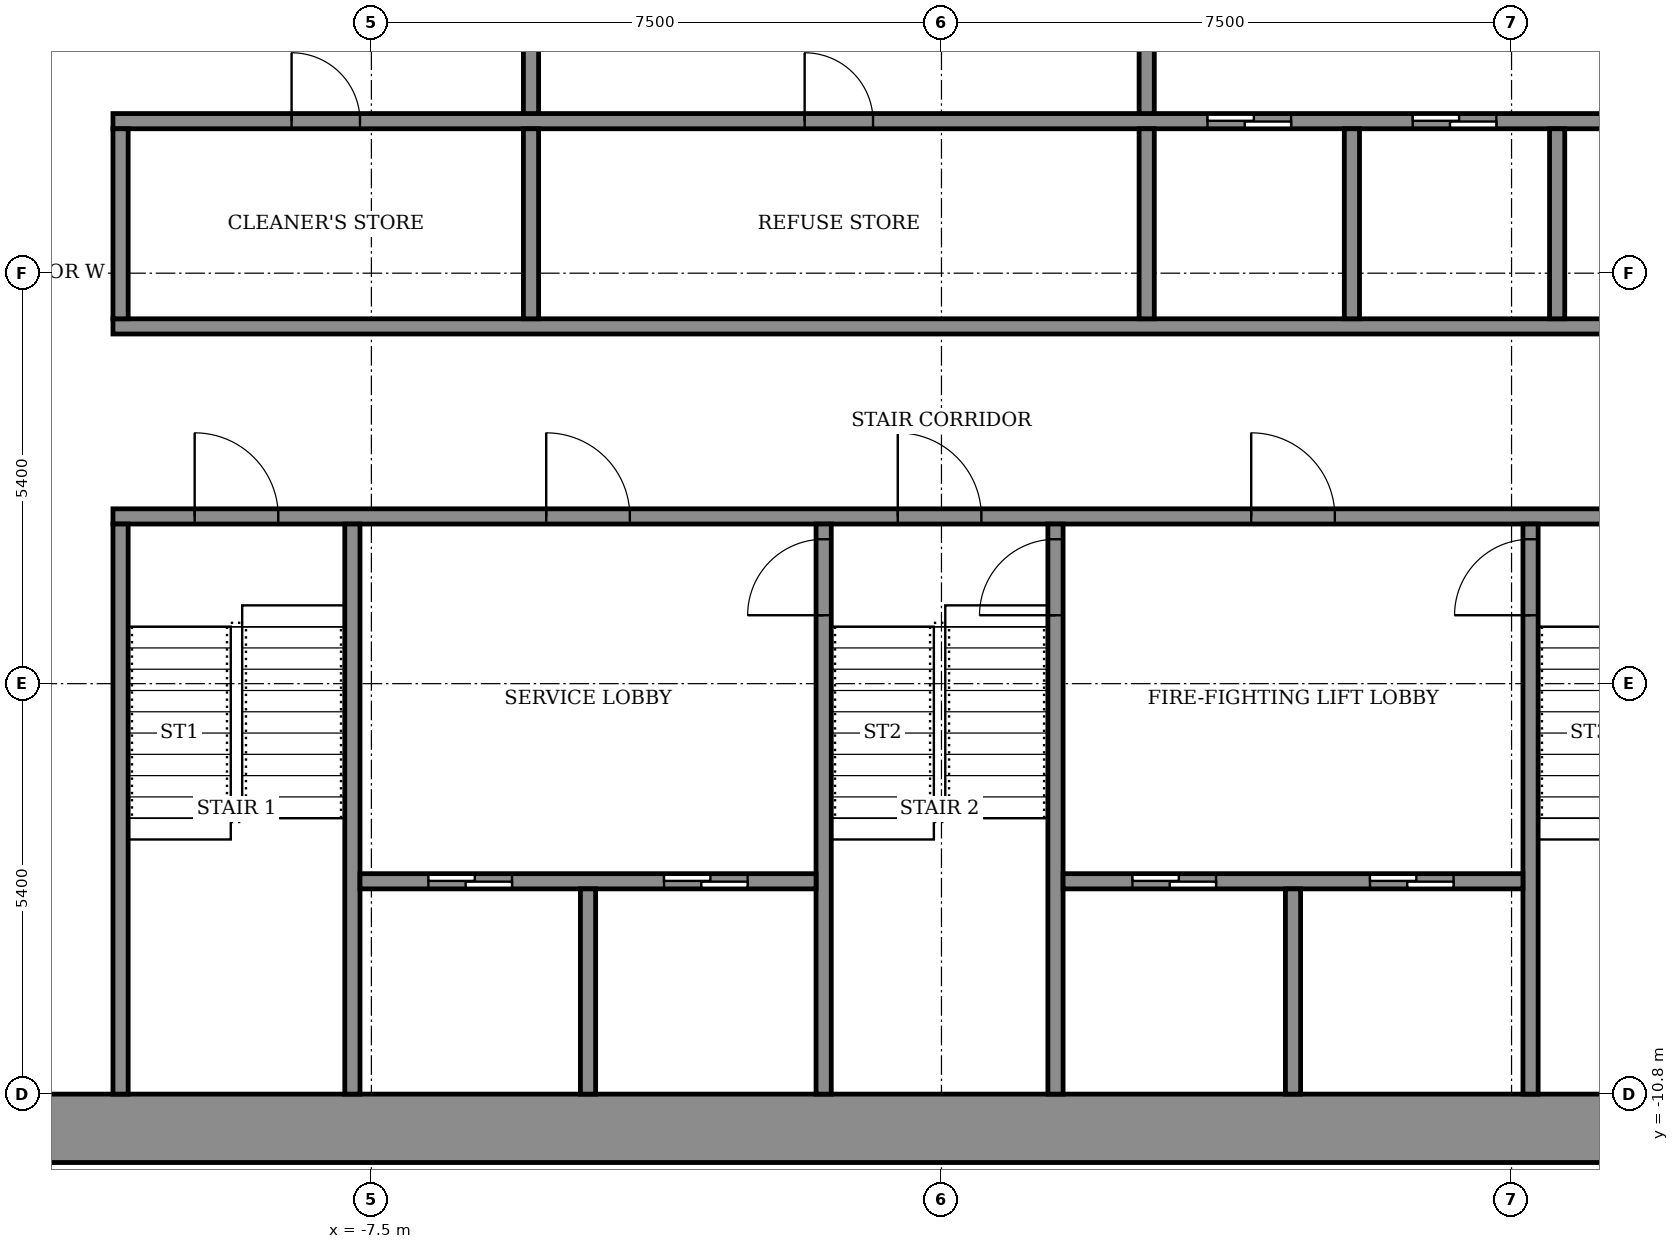
"""IFC4 building model, lengths in metres.
Left out: names, types, materials, properties, quantities, classifications, styles, units other than length and angle.
Written with IfcOpenShell. Run it as: python <this file> out.ifc"""

import sys

from ifc_helpers import new_model, si_unit, direction, frame, frame_2d, origin, place, context, subcontext, project, spatial, rectangle, extrude, element, fill, save


model = new_model("IFC4")
c1 = context("Model", 3, precision=1e-05, world=origin(), true_north=direction((0.0, 1.0)))
c2 = subcontext(c1, "Body", "Model", "MODEL_VIEW")
j1 = project(units=[si_unit("LENGTHUNIT", "METRE"), si_unit("PLANEANGLEUNIT", "RADIAN")], contexts=[c1])
p1 = place(None, origin())
s1 = spatial("IfcSite", under=j1, at=p1, CompositionType="ELEMENT")
p2 = place(p1, origin())
s2 = spatial("IfcBuilding", under=s1, at=p2, CompositionType="ELEMENT")
p3 = place(p2, frame((0.0, 0.0, 182.5)))
s3 = spatial("IfcBuildingStorey", under=s2, at=p3, CompositionType="ELEMENT", Elevation=182.5)
p4 = place(p3, frame((-14.7, -11.25, 0.0), z_axis=(0.0, 0.0, 1.0), x_axis=(1.0, 0.0, 0.0)))
e1 = element("IfcWall", 1, at=p4, inside=s3, PredefinedType="SHEAR", context=c2, shape_type="SweptSolid", body=[
    extrude(rectangle(XDim=29.4, YDim=0.9, at=frame_2d((14.7, 0.0))), origin(), (0.0, 0.0, 1.0), 3.6),
])
p5 = place(p3, frame((-10.9, -3.2, 0.0), z_axis=(0.0, 0.0, 1.0), x_axis=(1.0, 0.0, 0.0)))
e2 = element("IfcWall", 2, at=p5, inside=s3, PredefinedType="SHEAR", context=c2, shape_type="SweptSolid", body=[
    extrude(rectangle(XDim=21.8, YDim=0.2, at=frame_2d((10.9, 0.0))), origin(), (0.0, 0.0, 1.0), 3.05),
])
p6 = place(p5, frame((1.075, 0.0, 0.0)))
e3 = element("IfcOpeningElement", 3, at=p6, cuts=e2, PredefinedType="OPENING", context=c2, shape_type="SweptSolid", body=[
    extrude(rectangle(XDim=1.1, YDim=2.1, at=frame_2d((0.55, 1.05))), frame((0.0, 0.11, 0.0), z_axis=(0.0, -1.0, 0.0), x_axis=(1.0, 0.0, 0.0)), (0.0, 0.0, 1.0), 0.22),
])
p7 = place(p5, frame((10.325, 0.0, 0.0)))
e4 = element("IfcOpeningElement", 4, at=p7, cuts=e2, PredefinedType="OPENING", context=c2, shape_type="SweptSolid", body=[
    extrude(rectangle(XDim=1.1, YDim=2.1, at=frame_2d((0.55, 1.05))), frame((0.0, 0.11, 0.0), z_axis=(0.0, -1.0, 0.0), x_axis=(1.0, 0.0, 0.0)), (0.0, 0.0, 1.0), 0.22),
])
p8 = place(p5, frame((19.625, 0.0, 0.0)))
e5 = element("IfcOpeningElement", 5, at=p8, cuts=e2, PredefinedType="OPENING", context=c2, shape_type="SweptSolid", body=[
    extrude(rectangle(XDim=1.1, YDim=2.1, at=frame_2d((0.55, 1.05))), frame((0.0, 0.11, 0.0), z_axis=(0.0, -1.0, 0.0), x_axis=(1.0, 0.0, 0.0)), (0.0, 0.0, 1.0), 0.22),
])
p9 = place(p5, frame((5.7, 0.0, 0.0)))
e6 = element("IfcOpeningElement", 6, at=p9, cuts=e2, PredefinedType="OPENING", context=c2, shape_type="SweptSolid", body=[
    extrude(rectangle(XDim=1.1, YDim=2.1, at=frame_2d((0.55, 1.05))), frame((0.0, 0.11, 0.0), z_axis=(0.0, -1.0, 0.0), x_axis=(1.0, 0.0, 0.0)), (0.0, 0.0, 1.0), 0.22),
])
p10 = place(p5, frame((14.975, 0.0, 0.0)))
e7 = element("IfcOpeningElement", 7, at=p10, cuts=e2, PredefinedType="OPENING", context=c2, shape_type="SweptSolid", body=[
    extrude(rectangle(XDim=1.1, YDim=2.1, at=frame_2d((0.55, 1.05))), frame((0.0, 0.11, 0.0), z_axis=(0.0, -1.0, 0.0), x_axis=(1.0, 0.0, 0.0)), (0.0, 0.0, 1.0), 0.22),
])
p11 = place(p3, frame((-10.9, -0.7, 0.0), z_axis=(0.0, 0.0, 1.0), x_axis=(1.0, 0.0, 0.0)))
e8 = element("IfcWall", 8, at=p11, inside=s3, PredefinedType="SHEAR", context=c2, shape_type="SweptSolid", body=[
    extrude(rectangle(XDim=21.8, YDim=0.2, at=frame_2d((10.9, 0.0))), origin(), (0.0, 0.0, 1.0), 3.05),
])
p12 = place(p3, frame((-10.9, 2.0, 0.0), z_axis=(0.0, 0.0, 1.0), x_axis=(1.0, 0.0, 0.0)))
e9 = element("IfcWall", 9, at=p12, inside=s3, PredefinedType="SHEAR", context=c2, shape_type="SweptSolid", body=[
    extrude(rectangle(XDim=21.8, YDim=0.2, at=frame_2d((10.9, 0.0))), origin(), (0.0, 0.0, 1.0), 3.05),
])
p13 = place(p12, frame((14.4, 0.0, 0.0)))
e10 = element("IfcOpeningElement", 10, at=p13, cuts=e9, PredefinedType="OPENING", context=c2, shape_type="SweptSolid", body=[
    extrude(rectangle(XDim=1.1, YDim=2.1, at=frame_2d((0.55, 1.05))), frame((0.0, 0.11, 0.0), z_axis=(0.0, -1.0, 0.0), x_axis=(1.0, 0.0, 0.0)), (0.0, 0.0, 1.0), 0.22),
])
p14 = place(p12, frame((17.1, 0.0, 0.0)))
e11 = element("IfcOpeningElement", 11, at=p14, cuts=e9, PredefinedType="OPENING", context=c2, shape_type="SweptSolid", body=[
    extrude(rectangle(XDim=1.1, YDim=2.1, at=frame_2d((0.55, 1.05))), frame((0.0, 0.11, 0.0), z_axis=(0.0, -1.0, 0.0), x_axis=(1.0, 0.0, 0.0)), (0.0, 0.0, 1.0), 0.22),
])
p15 = place(p12, frame((19.8, 0.0, 0.0)))
e12 = element("IfcOpeningElement", 12, at=p15, cuts=e9, PredefinedType="OPENING", context=c2, shape_type="SweptSolid", body=[
    extrude(rectangle(XDim=1.1, YDim=2.1, at=frame_2d((0.55, 1.05))), frame((0.0, 0.11, 0.0), z_axis=(0.0, -1.0, 0.0), x_axis=(1.0, 0.0, 0.0)), (0.0, 0.0, 1.0), 0.22),
])
p16 = place(p12, frame((2.35, 0.0, 0.0)))
e13 = element("IfcOpeningElement", 13, at=p16, cuts=e9, PredefinedType="OPENING", context=c2, shape_type="SweptSolid", body=[
    extrude(rectangle(XDim=0.9, YDim=2.1, at=frame_2d((0.45, 1.05))), frame((0.0, 0.11, 0.0), z_axis=(0.0, -1.0, 0.0), x_axis=(1.0, 0.0, 0.0)), (0.0, 0.0, 1.0), 0.22),
])
p17 = place(p12, frame((9.1, 0.0, 0.0)))
e14 = element("IfcOpeningElement", 14, at=p17, cuts=e9, PredefinedType="OPENING", context=c2, shape_type="SweptSolid", body=[
    extrude(rectangle(XDim=0.9, YDim=2.1, at=frame_2d((0.45, 1.05))), frame((0.0, 0.11, 0.0), z_axis=(0.0, -1.0, 0.0), x_axis=(1.0, 0.0, 0.0)), (0.0, 0.0, 1.0), 0.22),
])
for number, where, z_axis, x_axis in (
    (15, (-10.8, -10.8, 0.0), (0.0, 0.0, 1.0), (0.0, 1.0, 0.0)),
    (16, (-7.75, -10.8, 0.0), (0.0, 0.0, 1.0), (0.0, 1.0, 0.0)),
):
    element("IfcWall", number, at=place(p3, frame(where, z_axis=z_axis, x_axis=x_axis)), inside=s3, PredefinedType="SHEAR", context=c2, shape_type="SweptSolid", body=[
        extrude(rectangle(XDim=7.5, YDim=0.2, at=frame_2d((3.75, 0.0))), origin(), (0.0, 0.0, 1.0), 3.05),
    ])
p18 = place(p3, frame((-1.55, -10.8, 0.0), z_axis=(0.0, 0.0, 1.0), x_axis=(0.0, 1.0, 0.0)))
e17 = element("IfcWall", 17, at=p18, inside=s3, PredefinedType="SHEAR", context=c2, shape_type="SweptSolid", body=[
    extrude(rectangle(XDim=7.5, YDim=0.2, at=frame_2d((3.75, 0.0))), origin(), (0.0, 0.0, 1.0), 3.05),
])
p19 = place(p18, frame((6.3, 0.0, 0.0)))
e18 = element("IfcOpeningElement", 18, at=p19, cuts=e17, PredefinedType="OPENING", context=c2, shape_type="SweptSolid", body=[
    extrude(rectangle(XDim=1.0, YDim=2.1, at=frame_2d((0.5, 1.05))), frame((0.0, 0.11, 0.0), z_axis=(0.0, -1.0, 0.0), x_axis=(1.0, 0.0, 0.0)), (0.0, 0.0, 1.0), 0.22),
])
p20 = place(p3, frame((1.5, -10.8, 0.0), z_axis=(0.0, 0.0, 1.0), x_axis=(0.0, 1.0, 0.0)))
e19 = element("IfcWall", 19, at=p20, inside=s3, PredefinedType="SHEAR", context=c2, shape_type="SweptSolid", body=[
    extrude(rectangle(XDim=7.5, YDim=0.2, at=frame_2d((3.75, 0.0))), origin(), (0.0, 0.0, 1.0), 3.05),
])
p21 = place(p20, frame((6.3, 0.0, 0.0)))
e20 = element("IfcOpeningElement", 20, at=p21, cuts=e19, PredefinedType="OPENING", context=c2, shape_type="SweptSolid", body=[
    extrude(rectangle(XDim=1.0, YDim=2.1, at=frame_2d((0.5, 1.05))), frame((0.0, 0.11, 0.0), z_axis=(0.0, -1.0, 0.0), x_axis=(1.0, 0.0, 0.0)), (0.0, 0.0, 1.0), 0.22),
])
p22 = place(p3, frame((7.75, -10.8, 0.0), z_axis=(0.0, 0.0, 1.0), x_axis=(0.0, 1.0, 0.0)))
e21 = element("IfcWall", 21, at=p22, inside=s3, PredefinedType="SHEAR", context=c2, shape_type="SweptSolid", body=[
    extrude(rectangle(XDim=7.5, YDim=0.2, at=frame_2d((3.75, 0.0))), origin(), (0.0, 0.0, 1.0), 3.05),
])
p23 = place(p22, frame((6.3, 0.0, 0.0)))
e22 = element("IfcOpeningElement", 22, at=p23, cuts=e21, PredefinedType="OPENING", context=c2, shape_type="SweptSolid", body=[
    extrude(rectangle(XDim=1.0, YDim=2.1, at=frame_2d((0.5, 1.05))), frame((0.0, 0.11, 0.0), z_axis=(0.0, -1.0, 0.0), x_axis=(1.0, 0.0, 0.0)), (0.0, 0.0, 1.0), 0.22),
])
p24 = place(p3, frame((-7.65, -8.0, 0.0), z_axis=(0.0, 0.0, 1.0), x_axis=(1.0, 0.0, 0.0)))
e23 = element("IfcWall", 23, at=p24, inside=s3, PredefinedType="SHEAR", context=c2, shape_type="SweptSolid", body=[
    extrude(rectangle(XDim=6.0, YDim=0.2, at=frame_2d((3.0, 0.0))), origin(), (0.0, 0.0, 1.0), 3.05),
])
p25 = place(p24, frame((0.9, 0.0, 0.0)))
e24 = element("IfcOpeningElement", 24, at=p25, cuts=e23, PredefinedType="OPENING", context=c2, shape_type="SweptSolid", body=[
    extrude(rectangle(XDim=1.1, YDim=2.1, at=frame_2d((0.55, 1.05))), frame((0.0, 0.11, 0.0), z_axis=(0.0, -1.0, 0.0), x_axis=(1.0, 0.0, 0.0)), (0.0, 0.0, 1.0), 0.22),
])
p26 = place(p24, frame((4.0, 0.0, 0.0)))
e25 = element("IfcOpeningElement", 25, at=p26, cuts=e23, PredefinedType="OPENING", context=c2, shape_type="SweptSolid", body=[
    extrude(rectangle(XDim=1.1, YDim=2.1, at=frame_2d((0.55, 1.05))), frame((0.0, 0.11, 0.0), z_axis=(0.0, -1.0, 0.0), x_axis=(1.0, 0.0, 0.0)), (0.0, 0.0, 1.0), 0.22),
])
p27 = place(p3, frame((-4.65, -10.8, 0.0), z_axis=(0.0, 0.0, 1.0), x_axis=(0.0, 1.0, 0.0)))
e26 = element("IfcWall", 26, at=p27, inside=s3, PredefinedType="SHEAR", context=c2, shape_type="SweptSolid", body=[
    extrude(rectangle(XDim=2.7, YDim=0.2, at=frame_2d((1.35, 0.0))), origin(), (0.0, 0.0, 1.0), 3.05),
])
p28 = place(p3, frame((1.6, -8.0, 0.0), z_axis=(0.0, 0.0, 1.0), x_axis=(1.0, 0.0, 0.0)))
e27 = element("IfcWall", 27, at=p28, inside=s3, PredefinedType="SHEAR", context=c2, shape_type="SweptSolid", body=[
    extrude(rectangle(XDim=6.05, YDim=0.2, at=frame_2d((3.025, 0.0))), origin(), (0.0, 0.0, 1.0), 3.05),
])
p29 = place(p28, frame((0.913, 0.0, 0.0)))
e28 = element("IfcOpeningElement", 28, at=p29, cuts=e27, PredefinedType="OPENING", context=c2, shape_type="SweptSolid", body=[
    extrude(rectangle(XDim=1.1, YDim=2.1, at=frame_2d((0.55, 1.05))), frame((0.0, 0.11, 0.0), z_axis=(0.0, -1.0, 0.0), x_axis=(1.0, 0.0, 0.0)), (0.0, 0.0, 1.0), 0.22),
])
p30 = place(p28, frame((4.038, 0.0, 0.0)))
e29 = element("IfcOpeningElement", 29, at=p30, cuts=e27, PredefinedType="OPENING", context=c2, shape_type="SweptSolid", body=[
    extrude(rectangle(XDim=1.1, YDim=2.1, at=frame_2d((0.55, 1.05))), frame((0.0, 0.11, 0.0), z_axis=(0.0, -1.0, 0.0), x_axis=(1.0, 0.0, 0.0)), (0.0, 0.0, 1.0), 0.22),
])
p31 = place(p3, frame((4.625, -10.8, 0.0), z_axis=(0.0, 0.0, 1.0), x_axis=(0.0, 1.0, 0.0)))
e30 = element("IfcWall", 30, at=p31, inside=s3, PredefinedType="SHEAR", context=c2, shape_type="SweptSolid", body=[
    extrude(rectangle(XDim=2.7, YDim=0.2, at=frame_2d((1.35, 0.0))), origin(), (0.0, 0.0, 1.0), 3.05),
])
for number, where, z_axis, x_axis in (
    (31, (-10.8, -0.6, 0.0), (0.0, 0.0, 1.0), (0.0, 1.0, 0.0)),
    (32, (-5.4, -0.6, 0.0), (0.0, 0.0, 1.0), (0.0, 1.0, 0.0)),
):
    element("IfcWall", number, at=place(p3, frame(where, z_axis=z_axis, x_axis=x_axis)), inside=s3, PredefinedType="STANDARD", context=c2, shape_type="SweptSolid", body=[
        extrude(rectangle(XDim=2.5, YDim=0.2, at=frame_2d((1.25, 0.0))), origin(), (0.0, 0.0, 1.0), 3.05),
    ])
for number, where, z_axis, x_axis in (
    (33, (2.7, -0.6, 0.0), (0.0, 0.0, 1.0), (0.0, 1.0, 0.0)),
    (34, (5.4, -0.6, 0.0), (0.0, 0.0, 1.0), (0.0, 1.0, 0.0)),
    (35, (8.1, -0.6, 0.0), (0.0, 0.0, 1.0), (0.0, 1.0, 0.0)),
):
    element("IfcWall", number, at=place(p3, frame(where, z_axis=z_axis, x_axis=x_axis)), inside=s3, PredefinedType="SHEAR", context=c2, shape_type="SweptSolid", body=[
        extrude(rectangle(XDim=2.5, YDim=0.2, at=frame_2d((1.25, 0.0))), origin(), (0.0, 0.0, 1.0), 3.05),
    ])
p32 = place(p3, frame((-5.4, 2.1, 0.0), z_axis=(0.0, 0.0, 1.0), x_axis=(0.0, 1.0, 0.0)))
e36 = element("IfcWall", 36, at=p32, inside=s3, PredefinedType="STANDARD", context=c2, shape_type="SweptSolid", body=[
    extrude(rectangle(XDim=5.9, YDim=0.2, at=frame_2d((2.95, 0.0))), origin(), (0.0, 0.0, 1.0), 3.05),
])
p33 = place(p32, frame((2.35, 0.0, 0.0)))
e37 = element("IfcOpeningElement", 37, at=p33, cuts=e36, PredefinedType="OPENING", context=c2, shape_type="SweptSolid", body=[
    extrude(rectangle(XDim=1.2, YDim=2.1, at=frame_2d((0.6, 1.05))), frame((0.0, 0.11, 0.0), z_axis=(0.0, -1.0, 0.0), x_axis=(1.0, 0.0, 0.0)), (0.0, 0.0, 1.0), 0.22),
])
p34 = place(p3, frame((2.7, 2.1, 0.0), z_axis=(0.0, 0.0, 1.0), x_axis=(0.0, 1.0, 0.0)))
e38 = element("IfcWall", 38, at=p34, inside=s3, PredefinedType="STANDARD", context=c2, shape_type="SweptSolid", body=[
    extrude(rectangle(XDim=5.9, YDim=0.2, at=frame_2d((2.95, 0.0))), origin(), (0.0, 0.0, 1.0), 3.05),
])
p35 = place(p34, frame((2.35, 0.0, 0.0)))
e39 = element("IfcOpeningElement", 39, at=p35, cuts=e38, PredefinedType="OPENING", context=c2, shape_type="SweptSolid", body=[
    extrude(rectangle(XDim=1.2, YDim=2.1, at=frame_2d((0.6, 1.05))), frame((0.0, 0.11, 0.0), z_axis=(0.0, -1.0, 0.0), x_axis=(1.0, 0.0, 0.0)), (0.0, 0.0, 1.0), 0.22),
])
p36 = place(p13, origin())
e40 = element("IfcDoor", 40, at=p36, inside=s3, OperationType="SLIDING_TO_LEFT", PredefinedType="DOOR", context=c2, shape_type="SweptSolid", body=[
    extrude(rectangle(XDim=1.1, YDim=2.1, at=frame_2d((0.55, 1.05))), frame((0.0, 0.025, 0.0), z_axis=(0.0, -1.0, 0.0), x_axis=(1.0, 0.0, 0.0)), (0.0, 0.0, 1.0), 0.05),
])
fill(e10, e40)
p37 = place(p14, origin())
e41 = element("IfcDoor", 41, at=p37, inside=s3, OperationType="SLIDING_TO_LEFT", PredefinedType="DOOR", context=c2, shape_type="SweptSolid", body=[
    extrude(rectangle(XDim=1.1, YDim=2.1, at=frame_2d((0.55, 1.05))), frame((0.0, 0.025, 0.0), z_axis=(0.0, -1.0, 0.0), x_axis=(1.0, 0.0, 0.0)), (0.0, 0.0, 1.0), 0.05),
])
fill(e11, e41)
p38 = place(p16, origin())
e42 = element("IfcDoor", 42, at=p38, inside=s3, OperationType="SINGLE_SWING_RIGHT", PredefinedType="DOOR", context=c2, shape_type="SweptSolid", body=[
    extrude(rectangle(XDim=0.9, YDim=2.1, at=frame_2d((0.45, 1.05))), frame((0.0, 0.025, 0.0), z_axis=(0.0, -1.0, 0.0), x_axis=(1.0, 0.0, 0.0)), (0.0, 0.0, 1.0), 0.05),
])
fill(e13, e42)
p39 = place(p17, origin())
e43 = element("IfcDoor", 43, at=p39, inside=s3, OperationType="SINGLE_SWING_RIGHT", PredefinedType="DOOR", context=c2, shape_type="SweptSolid", body=[
    extrude(rectangle(XDim=0.9, YDim=2.1, at=frame_2d((0.45, 1.05))), frame((0.0, 0.025, 0.0), z_axis=(0.0, -1.0, 0.0), x_axis=(1.0, 0.0, 0.0)), (0.0, 0.0, 1.0), 0.05),
])
fill(e14, e43)
p40 = place(p29, origin())
e44 = element("IfcDoor", 44, at=p40, inside=s3, OperationType="SLIDING_TO_LEFT", PredefinedType="DOOR", context=c2, shape_type="SweptSolid", body=[
    extrude(rectangle(XDim=1.1, YDim=2.1, at=frame_2d((0.55, 1.05))), frame((0.0, 0.025, 0.0), z_axis=(0.0, -1.0, 0.0), x_axis=(1.0, 0.0, 0.0)), (0.0, 0.0, 1.0), 0.05),
])
fill(e28, e44)
p41 = place(p25, origin())
e45 = element("IfcDoor", 45, at=p41, inside=s3, OperationType="SLIDING_TO_LEFT", PredefinedType="DOOR", context=c2, shape_type="SweptSolid", body=[
    extrude(rectangle(XDim=1.1, YDim=2.1, at=frame_2d((0.55, 1.05))), frame((0.0, 0.025, 0.0), z_axis=(0.0, -1.0, 0.0), x_axis=(1.0, 0.0, 0.0)), (0.0, 0.0, 1.0), 0.05),
])
fill(e24, e45)
p42 = place(p30, origin())
e46 = element("IfcDoor", 46, at=p42, inside=s3, OperationType="SLIDING_TO_LEFT", PredefinedType="DOOR", context=c2, shape_type="SweptSolid", body=[
    extrude(rectangle(XDim=1.1, YDim=2.1, at=frame_2d((0.55, 1.05))), frame((0.0, 0.025, 0.0), z_axis=(0.0, -1.0, 0.0), x_axis=(1.0, 0.0, 0.0)), (0.0, 0.0, 1.0), 0.05),
])
fill(e29, e46)
p43 = place(p26, origin())
e47 = element("IfcDoor", 47, at=p43, inside=s3, OperationType="SLIDING_TO_LEFT", PredefinedType="DOOR", context=c2, shape_type="SweptSolid", body=[
    extrude(rectangle(XDim=1.1, YDim=2.1, at=frame_2d((0.55, 1.05))), frame((0.0, 0.025, 0.0), z_axis=(0.0, -1.0, 0.0), x_axis=(1.0, 0.0, 0.0)), (0.0, 0.0, 1.0), 0.05),
])
fill(e25, e47)
p44 = place(p6, origin())
e48 = element("IfcDoor", 48, at=p44, inside=s3, OperationType="SINGLE_SWING_RIGHT", PredefinedType="DOOR", context=c2, shape_type="SweptSolid", body=[
    extrude(rectangle(XDim=1.1, YDim=2.1, at=frame_2d((0.55, 1.05))), frame((0.0, 0.025, 0.0), z_axis=(0.0, -1.0, 0.0), x_axis=(1.0, 0.0, 0.0)), (0.0, 0.0, 1.0), 0.05),
])
fill(e3, e48)
p45 = place(p7, origin())
e49 = element("IfcDoor", 49, at=p45, inside=s3, OperationType="SINGLE_SWING_RIGHT", PredefinedType="DOOR", context=c2, shape_type="SweptSolid", body=[
    extrude(rectangle(XDim=1.1, YDim=2.1, at=frame_2d((0.55, 1.05))), frame((0.0, 0.025, 0.0), z_axis=(0.0, -1.0, 0.0), x_axis=(1.0, 0.0, 0.0)), (0.0, 0.0, 1.0), 0.05),
])
fill(e4, e49)
p46 = place(p9, origin())
e50 = element("IfcDoor", 50, at=p46, inside=s3, OperationType="SINGLE_SWING_LEFT", PredefinedType="DOOR", context=c2, shape_type="SweptSolid", body=[
    extrude(rectangle(XDim=1.1, YDim=2.1, at=frame_2d((0.55, 1.05))), frame((0.0, 0.025, 0.0), z_axis=(0.0, -1.0, 0.0), x_axis=(1.0, 0.0, 0.0)), (0.0, 0.0, 1.0), 0.05),
])
fill(e6, e50)
p47 = place(p10, origin())
e51 = element("IfcDoor", 51, at=p47, inside=s3, OperationType="SINGLE_SWING_LEFT", PredefinedType="DOOR", context=c2, shape_type="SweptSolid", body=[
    extrude(rectangle(XDim=1.1, YDim=2.1, at=frame_2d((0.55, 1.05))), frame((0.0, 0.025, 0.0), z_axis=(0.0, -1.0, 0.0), x_axis=(1.0, 0.0, 0.0)), (0.0, 0.0, 1.0), 0.05),
])
fill(e7, e51)
p48 = place(p19, origin())
e52 = element("IfcDoor", 52, at=p48, inside=s3, OperationType="SINGLE_SWING_RIGHT", PredefinedType="DOOR", context=c2, shape_type="SweptSolid", body=[
    extrude(rectangle(XDim=1.0, YDim=2.1, at=frame_2d((0.5, 1.05))), frame((0.0, 0.025, 0.0), z_axis=(0.0, -1.0, 0.0), x_axis=(1.0, 0.0, 0.0)), (0.0, 0.0, 1.0), 0.05),
])
fill(e18, e52)
p49 = place(p21, origin())
e53 = element("IfcDoor", 53, at=p49, inside=s3, OperationType="SINGLE_SWING_RIGHT", PredefinedType="DOOR", context=c2, shape_type="SweptSolid", body=[
    extrude(rectangle(XDim=1.0, YDim=2.1, at=frame_2d((0.5, 1.05))), frame((0.0, 0.025, 0.0), z_axis=(0.0, -1.0, 0.0), x_axis=(1.0, 0.0, 0.0)), (0.0, 0.0, 1.0), 0.05),
])
fill(e20, e53)
p50 = place(p23, origin())
e54 = element("IfcDoor", 54, at=p50, inside=s3, OperationType="SINGLE_SWING_RIGHT", PredefinedType="DOOR", context=c2, shape_type="SweptSolid", body=[
    extrude(rectangle(XDim=1.0, YDim=2.1, at=frame_2d((0.5, 1.05))), frame((0.0, 0.025, 0.0), z_axis=(0.0, -1.0, 0.0), x_axis=(1.0, 0.0, 0.0)), (0.0, 0.0, 1.0), 0.05),
])
fill(e22, e54)
save(model, sys.argv[1])
